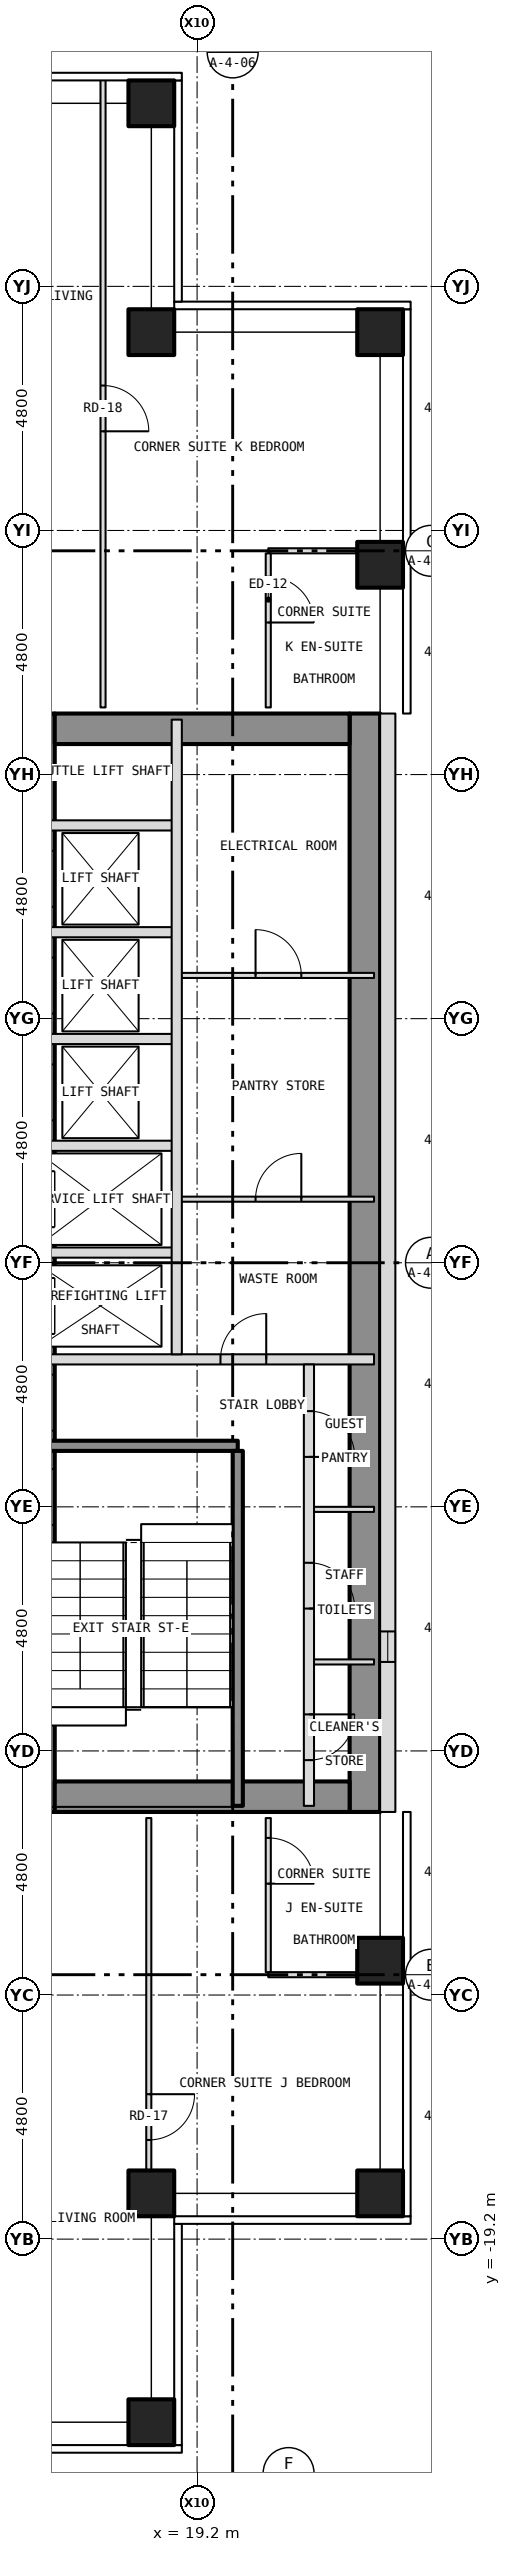
"""IFC4 building model, lengths in metres.
Left out: names, types, materials, properties, quantities, classifications, styles, units other than length and angle.
Written with IfcOpenShell. Run it as: python <this file> out.ifc"""

import sys

from ifc_helpers import new_model, si_unit, direction, frame, frame_2d, origin, origin_2d, place, context, subcontext, project, spatial, rectangle, hollow_rectangle, extrude, element, fill, save


model = new_model("IFC4")
c1 = context("Model", 3, precision=1e-05, world=origin(), true_north=direction((0.0, 1.0)))
c2 = subcontext(c1, "Body", "Model", "MODEL_VIEW")
j1 = project(units=[si_unit("LENGTHUNIT", "METRE"), si_unit("PLANEANGLEUNIT", "RADIAN")], contexts=[c1])
p1 = place(None, origin())
s1 = spatial("IfcSite", under=j1, at=p1, CompositionType="ELEMENT")
p2 = place(p1, origin())
s2 = spatial("IfcBuilding", under=s1, at=p2, CompositionType="ELEMENT")
p3 = place(p2, frame((0.0, 0.0, 113.5)))
s3 = spatial("IfcBuildingStorey", under=s2, at=p3, CompositionType="ELEMENT", Elevation=113.5)
for number, where, z_axis, x_axis in (
    (1, (18.3, 22.8, -0.15), (0.0, 0.0, 1.0), (1.0, 0.0, 0.0)),
    (2, (18.3, -22.8, -0.15), (0.0, 0.0, 1.0), (1.0, 0.0, 0.0)),
    (3, (22.8, -18.3, -0.15), (0.0, 0.0, 1.0), (1.0, 0.0, 0.0)),
    (4, (22.8, -13.725, -0.15), (0.0, 0.0, 1.0), (1.0, 0.0, 0.0)),
    (5, (22.8, 13.725, -0.15), (0.0, 0.0, 1.0), (1.0, 0.0, 0.0)),
    (6, (22.8, 18.3, -0.15), (0.0, 0.0, 1.0), (1.0, 0.0, 0.0)),
    (7, (18.3, -18.3, -0.15), (0.0, 0.0, 1.0), (1.0, 0.0, 0.0)),
    (8, (18.3, 18.3, -0.15), (0.0, 0.0, 1.0), (1.0, 0.0, 0.0)),
):
    element("IfcColumn", number, at=place(p3, frame(where, z_axis=z_axis, x_axis=x_axis)), inside=s3, PredefinedType="COLUMN", context=c2, shape_type="SweptSolid", body=[
        extrude(hollow_rectangle(XDim=0.9, YDim=0.9, WallThickness=0.05, at=origin_2d()), origin(), (0.0, 0.0, 1.0), 3.5),
    ])
p4 = place(p3, frame((16.1, -10.8, 0.0), z_axis=(0.0, 0.0, 1.0), x_axis=(0.0, 1.0, 0.0)))
e9 = element("IfcWall", 9, at=p4, inside=s3, PredefinedType="SHEAR", context=c2, shape_type="SweptSolid", body=[
    extrude(rectangle(XDim=21.6, YDim=0.6, at=frame_2d((10.8, 0.0))), origin(), (0.0, 0.0, 1.0), 3.25),
])
p5 = place(p4, frame((9.4, 0.0, 0.0)))
e10 = element("IfcOpeningElement", 10, at=p5, cuts=e9, PredefinedType="OPENING", context=c2, shape_type="SweptSolid", body=[
    extrude(rectangle(XDim=1.1, YDim=2.1, at=frame_2d((0.55, 1.05))), frame((0.0, 0.312, 0.0), z_axis=(0.0, -1.0, 0.0), x_axis=(1.0, 0.0, 0.0)), (0.0, 0.0, 1.0), 0.624),
])
p6 = place(p4, frame((11.5, 0.0, 0.0)))
e11 = element("IfcOpeningElement", 11, at=p6, cuts=e9, PredefinedType="OPENING", context=c2, shape_type="SweptSolid", body=[
    extrude(rectangle(XDim=1.1, YDim=2.1, at=frame_2d((0.55, 1.05))), frame((0.0, 0.312, 0.0), z_axis=(0.0, -1.0, 0.0), x_axis=(1.0, 0.0, 0.0)), (0.0, 0.0, 1.0), 0.624),
])
p7 = place(p4, frame((13.6, 0.0, 0.0)))
e12 = element("IfcOpeningElement", 12, at=p7, cuts=e9, PredefinedType="OPENING", context=c2, shape_type="SweptSolid", body=[
    extrude(rectangle(XDim=1.1, YDim=2.1, at=frame_2d((0.55, 1.05))), frame((0.0, 0.312, 0.0), z_axis=(0.0, -1.0, 0.0), x_axis=(1.0, 0.0, 0.0)), (0.0, 0.0, 1.0), 0.624),
])
p8 = place(p4, frame((15.7, 0.0, 0.0)))
e13 = element("IfcOpeningElement", 13, at=p8, cuts=e9, PredefinedType="OPENING", context=c2, shape_type="SweptSolid", body=[
    extrude(rectangle(XDim=1.1, YDim=2.1, at=frame_2d((0.55, 1.05))), frame((0.0, 0.312, 0.0), z_axis=(0.0, -1.0, 0.0), x_axis=(1.0, 0.0, 0.0)), (0.0, 0.0, 1.0), 0.624),
])
p9 = place(p4, frame((17.8, 0.0, 0.0)))
e14 = element("IfcOpeningElement", 14, at=p9, cuts=e9, PredefinedType="OPENING", context=c2, shape_type="SweptSolid", body=[
    extrude(rectangle(XDim=1.1, YDim=2.1, at=frame_2d((0.55, 1.05))), frame((0.0, 0.312, 0.0), z_axis=(0.0, -1.0, 0.0), x_axis=(1.0, 0.0, 0.0)), (0.0, 0.0, 1.0), 0.624),
])
p10 = place(p4, frame((5.642, 0.0, 0.0)))
e15 = element("IfcOpeningElement", 15, at=p10, cuts=e9, PredefinedType="OPENING", context=c2, shape_type="SweptSolid", body=[
    extrude(rectangle(XDim=1.1, YDim=2.1, at=frame_2d((0.55, 1.05))), frame((0.0, 0.312, 0.0), z_axis=(0.0, -1.0, 0.0), x_axis=(1.0, 0.0, 0.0)), (0.0, 0.0, 1.0), 0.624),
])
p11 = place(p4, frame((7.5, 0.0, 0.0)))
e16 = element("IfcOpeningElement", 16, at=p11, cuts=e9, PredefinedType="OPENING", context=c2, shape_type="SweptSolid", body=[
    extrude(rectangle(XDim=1.1, YDim=2.1, at=frame_2d((0.55, 1.05))), frame((0.0, 0.312, 0.0), z_axis=(0.0, -1.0, 0.0), x_axis=(1.0, 0.0, 0.0)), (0.0, 0.0, 1.0), 0.624),
])
p12 = place(p3, frame((22.5, -10.8, 0.0), z_axis=(0.0, 0.0, 1.0), x_axis=(0.0, 1.0, 0.0)))
e17 = element("IfcWall", 17, at=p12, inside=s3, PredefinedType="SHEAR", context=c2, shape_type="SweptSolid", body=[
    extrude(rectangle(XDim=21.6, YDim=0.6, at=frame_2d((10.8, 0.0))), origin(), (0.0, 0.0, 1.0), 3.25),
])
for number, where, z_axis, x_axis in (
    (18, (16.4, 10.5, 0.0), (0.0, 0.0, 1.0), (1.0, 0.0, 0.0)),
    (19, (16.4, -10.5, 0.0), (0.0, 0.0, 1.0), (1.0, 0.0, 0.0)),
):
    element("IfcWall", number, at=place(p3, frame(where, z_axis=z_axis, x_axis=x_axis)), inside=s3, PredefinedType="SHEAR", context=c2, shape_type="SweptSolid", body=[
        extrude(rectangle(XDim=5.8, YDim=0.6, at=frame_2d((2.9, 0.0))), origin(), (0.0, 0.0, 1.0), 3.25),
    ])
p13 = place(p3, frame((22.95, -10.8, 0.0), z_axis=(0.0, 0.0, 1.0), x_axis=(0.0, 1.0, 0.0)))
e20 = element("IfcWall", 20, at=p13, inside=s3, PredefinedType="SOLIDWALL", context=c2, shape_type="SweptSolid", body=[
    extrude(rectangle(XDim=21.6, YDim=0.3, at=frame_2d((10.8, 0.0))), origin(), (0.0, 0.0, 1.0), 3.5),
])
p14 = place(p13, frame((2.95, 0.0, 1.0)))
e21 = element("IfcOpeningElement", 21, at=p14, cuts=e20, PredefinedType="OPENING", context=c2, shape_type="SweptSolid", body=[
    extrude(rectangle(XDim=0.6, YDim=1.5, at=frame_2d((0.3, 0.75))), frame((0.0, 0.162, 0.0), z_axis=(0.0, -1.0, 0.0), x_axis=(1.0, 0.0, 0.0)), (0.0, 0.0, 1.0), 0.324),
])
p15 = place(p3, frame((20.6, -14.0, 0.0), z_axis=(0.0, 0.0, 1.0), x_axis=(1.0, 0.0, 0.0)))
e22 = element("IfcWall", 22, at=p15, inside=s3, PredefinedType="PARTITIONING", context=c2, shape_type="SweptSolid", body=[
    extrude(rectangle(XDim=2.08, YDim=0.1, at=frame_2d((1.04, 0.0))), origin(), (0.0, 0.0, 1.0), 3.35),
])
for number, where, z_axis, x_axis in (
    (23, (21.4, -7.85, 0.0), (0.0, 0.0, 1.0), (1.0, 0.0, 0.0)),
    (24, (21.4, -4.85, 0.0), (0.0, 0.0, 1.0), (1.0, 0.0, 0.0)),
):
    element("IfcWall", number, at=place(p3, frame(where, z_axis=z_axis, x_axis=x_axis)), inside=s3, PredefinedType="PARTITIONING", context=c2, shape_type="SweptSolid", body=[
        extrude(rectangle(XDim=1.28, YDim=0.1, at=frame_2d((0.64, 0.0))), origin(), (0.0, 0.0, 1.0), 3.25),
    ])
p16 = place(p3, frame((15.92, -3.6, 0.0), z_axis=(0.0, 0.0, 1.0), x_axis=(1.0, 0.0, 0.0)))
e25 = element("IfcWall", 25, at=p16, inside=s3, PredefinedType="SHEAR", context=c2, shape_type="SweptSolid", body=[
    extrude(rectangle(XDim=4.08, YDim=0.2, at=frame_2d((2.04, 0.0))), origin(), (0.0, 0.0, 1.0), 3.25),
])
p17 = place(p3, frame((15.92, -1.9, 0.0), z_axis=(0.0, 0.0, 1.0), x_axis=(1.0, 0.0, 0.0)))
e26 = element("IfcWall", 26, at=p17, inside=s3, PredefinedType="PARTITIONING", context=c2, shape_type="SweptSolid", body=[
    extrude(rectangle(XDim=6.76, YDim=0.2, at=frame_2d((3.38, 0.0))), origin(), (0.0, 0.0, 1.0), 3.25),
])
p18 = place(p17, frame((3.74, 0.0, 0.0)))
e27 = element("IfcOpeningElement", 27, at=p18, cuts=e26, PredefinedType="OPENING", context=c2, shape_type="SweptSolid", body=[
    extrude(rectangle(XDim=0.9, YDim=2.1, at=frame_2d((0.45, 1.05))), frame((0.0, 0.112, 0.0), z_axis=(0.0, -1.0, 0.0), x_axis=(1.0, 0.0, 0.0)), (0.0, 0.0, 1.0), 0.224),
])
p19 = place(p3, frame((15.92, 0.2, 0.0), z_axis=(0.0, 0.0, 1.0), x_axis=(1.0, 0.0, 0.0)))
e28 = element("IfcWall", 28, at=p19, inside=s3, PredefinedType="PARTITIONING", context=c2, shape_type="SweptSolid", body=[
    extrude(rectangle(XDim=2.88, YDim=0.2, at=frame_2d((1.44, 0.0))), origin(), (0.0, 0.0, 1.0), 3.25),
])
p20 = place(p3, frame((18.8, 1.25, 0.0), z_axis=(0.0, 0.0, 1.0), x_axis=(1.0, 0.0, 0.0)))
e29 = element("IfcWall", 29, at=p20, inside=s3, PredefinedType="PARTITIONING", context=c2, shape_type="SweptSolid", body=[
    extrude(rectangle(XDim=3.88, YDim=0.1, at=frame_2d((1.94, 0.0))), origin(), (0.0, 0.0, 1.0), 3.25),
])
p21 = place(p20, frame((1.55, 0.0, 0.0)))
e30 = element("IfcOpeningElement", 30, at=p21, cuts=e29, PredefinedType="OPENING", context=c2, shape_type="SweptSolid", body=[
    extrude(rectangle(XDim=0.9, YDim=2.1, at=frame_2d((0.45, 1.05))), frame((0.0, 0.062, 0.0), z_axis=(0.0, -1.0, 0.0), x_axis=(1.0, 0.0, 0.0)), (0.0, 0.0, 1.0), 0.124),
])
for number, where, z_axis, x_axis in (
    (31, (15.92, 2.3, 0.0), (0.0, 0.0, 1.0), (1.0, 0.0, 0.0)),
    (32, (15.92, 4.4, 0.0), (0.0, 0.0, 1.0), (1.0, 0.0, 0.0)),
):
    element("IfcWall", number, at=place(p3, frame(where, z_axis=z_axis, x_axis=x_axis)), inside=s3, PredefinedType="PARTITIONING", context=c2, shape_type="SweptSolid", body=[
        extrude(rectangle(XDim=2.88, YDim=0.2, at=frame_2d((1.44, 0.0))), origin(), (0.0, 0.0, 1.0), 3.25),
    ])
p22 = place(p3, frame((18.8, 5.65, 0.0), z_axis=(0.0, 0.0, 1.0), x_axis=(1.0, 0.0, 0.0)))
e33 = element("IfcWall", 33, at=p22, inside=s3, PredefinedType="PARTITIONING", context=c2, shape_type="SweptSolid", body=[
    extrude(rectangle(XDim=3.88, YDim=0.1, at=frame_2d((1.94, 0.0))), origin(), (0.0, 0.0, 1.0), 3.25),
])
p23 = place(p22, frame((1.55, 0.0, 0.0)))
e34 = element("IfcOpeningElement", 34, at=p23, cuts=e33, PredefinedType="OPENING", context=c2, shape_type="SweptSolid", body=[
    extrude(rectangle(XDim=0.9, YDim=2.1, at=frame_2d((0.45, 1.05))), frame((0.0, 0.062, 0.0), z_axis=(0.0, -1.0, 0.0), x_axis=(1.0, 0.0, 0.0)), (0.0, 0.0, 1.0), 0.124),
])
for number, where, z_axis, x_axis in (
    (35, (15.92, 6.5, 0.0), (0.0, 0.0, 1.0), (1.0, 0.0, 0.0)),
    (36, (15.92, 8.6, 0.0), (0.0, 0.0, 1.0), (1.0, 0.0, 0.0)),
):
    element("IfcWall", number, at=place(p3, frame(where, z_axis=z_axis, x_axis=x_axis)), inside=s3, PredefinedType="PARTITIONING", context=c2, shape_type="SweptSolid", body=[
        extrude(rectangle(XDim=2.88, YDim=0.2, at=frame_2d((1.44, 0.0))), origin(), (0.0, 0.0, 1.0), 3.25),
    ])
p24 = place(p3, frame((20.6, 14.0, 0.0), z_axis=(0.0, 0.0, 1.0), x_axis=(1.0, 0.0, 0.0)))
e37 = element("IfcWall", 37, at=p24, inside=s3, PredefinedType="PARTITIONING", context=c2, shape_type="SweptSolid", body=[
    extrude(rectangle(XDim=2.08, YDim=0.1, at=frame_2d((1.04, 0.0))), origin(), (0.0, 0.0, 1.0), 3.35),
])
p25 = place(p3, frame((17.35, 10.92, 0.0), z_axis=(0.0, 0.0, 1.0), x_axis=(0.0, 1.0, 0.0)))
e38 = element("IfcWall", 38, at=p25, inside=s3, PredefinedType="PARTITIONING", context=c2, shape_type="SweptSolid", body=[
    extrude(rectangle(XDim=12.36, YDim=0.1, at=frame_2d((6.18, 0.0))), origin(), (0.0, 0.0, 1.0), 3.35),
])
p26 = place(p25, frame((5.43, 0.0, 0.0)))
e39 = element("IfcOpeningElement", 39, at=p26, cuts=e38, PredefinedType="OPENING", context=c2, shape_type="SweptSolid", body=[
    extrude(rectangle(XDim=0.9, YDim=2.1, at=frame_2d((0.45, 1.05))), frame((0.0, 0.062, 0.0), z_axis=(0.0, -1.0, 0.0), x_axis=(1.0, 0.0, 0.0)), (0.0, 0.0, 1.0), 0.124),
])
p27 = place(p3, frame((18.25, -18.191, 0.0), z_axis=(0.0, 0.0, 1.0), x_axis=(0.0, 1.0, 0.0)))
e40 = element("IfcWall", 40, at=p27, inside=s3, PredefinedType="PARTITIONING", context=c2, shape_type="SweptSolid", body=[
    extrude(rectangle(XDim=7.271, YDim=0.1, at=frame_2d((3.635, 0.0))), origin(), (0.0, 0.0, 1.0), 3.35),
])
p28 = place(p27, frame((0.941, 0.0, 0.0)))
e41 = element("IfcOpeningElement", 41, at=p28, cuts=e40, PredefinedType="OPENING", context=c2, shape_type="SweptSolid", body=[
    extrude(rectangle(XDim=0.9, YDim=2.1, at=frame_2d((0.45, 1.05))), frame((0.0, 0.062, 0.0), z_axis=(0.0, -1.0, 0.0), x_axis=(1.0, 0.0, 0.0)), (0.0, 0.0, 1.0), 0.124),
])
p29 = place(p3, frame((18.8, -1.8, 0.0), z_axis=(0.0, 0.0, 1.0), x_axis=(0.0, 1.0, 0.0)))
e42 = element("IfcWall", 42, at=p29, inside=s3, PredefinedType="PARTITIONING", context=c2, shape_type="SweptSolid", body=[
    extrude(rectangle(XDim=12.48, YDim=0.2, at=frame_2d((6.24, 0.0))), origin(), (0.0, 0.0, 1.0), 3.25),
])
p30 = place(p3, frame((20.0, -10.68, 0.0), z_axis=(0.0, 0.0, 1.0), x_axis=(0.0, 1.0, 0.0)))
e43 = element("IfcWall", 43, at=p30, inside=s3, PredefinedType="SHEAR", context=c2, shape_type="SweptSolid", body=[
    extrude(rectangle(XDim=6.98, YDim=0.2, at=frame_2d((3.49, 0.0))), origin(), (0.0, 0.0, 1.0), 3.25),
])
p31 = place(p3, frame((20.6, -13.95, 0.0), z_axis=(0.0, 0.0, 1.0), x_axis=(0.0, 1.0, 0.0)))
e44 = element("IfcWall", 44, at=p31, inside=s3, PredefinedType="PARTITIONING", context=c2, shape_type="SweptSolid", body=[
    extrude(rectangle(XDim=3.03, YDim=0.1, at=frame_2d((1.515, 0.0))), origin(), (0.0, 0.0, 1.0), 3.35),
])
p32 = place(p31, frame((1.74, 0.0, 0.0)))
e45 = element("IfcOpeningElement", 45, at=p32, cuts=e44, PredefinedType="OPENING", context=c2, shape_type="SweptSolid", body=[
    extrude(rectangle(XDim=0.9, YDim=2.1, at=frame_2d((0.45, 1.05))), frame((0.0, 0.062, 0.0), z_axis=(0.0, -1.0, 0.0), x_axis=(1.0, 0.0, 0.0)), (0.0, 0.0, 1.0), 0.124),
])
p33 = place(p3, frame((20.6, 10.92, 0.0), z_axis=(0.0, 0.0, 1.0), x_axis=(0.0, 1.0, 0.0)))
e46 = element("IfcWall", 46, at=p33, inside=s3, PredefinedType="PARTITIONING", context=c2, shape_type="SweptSolid", body=[
    extrude(rectangle(XDim=3.03, YDim=0.1, at=frame_2d((1.515, 0.0))), origin(), (0.0, 0.0, 1.0), 3.35),
])
p34 = place(p33, frame((1.67, 0.0, 0.0)))
e47 = element("IfcOpeningElement", 47, at=p34, cuts=e46, PredefinedType="OPENING", context=c2, shape_type="SweptSolid", body=[
    extrude(rectangle(XDim=0.9, YDim=2.1, at=frame_2d((0.45, 1.05))), frame((0.0, 0.062, 0.0), z_axis=(0.0, -1.0, 0.0), x_axis=(1.0, 0.0, 0.0)), (0.0, 0.0, 1.0), 0.124),
])
p35 = place(p3, frame((21.4, -10.68, 0.0), z_axis=(0.0, 0.0, 1.0), x_axis=(0.0, 1.0, 0.0)))
e48 = element("IfcWall", 48, at=p35, inside=s3, PredefinedType="PARTITIONING", context=c2, shape_type="SweptSolid", body=[
    extrude(rectangle(XDim=8.68, YDim=0.2, at=frame_2d((4.34, 0.0))), origin(), (0.0, 0.0, 1.0), 3.25),
])
p36 = place(p35, frame((0.899, 0.0, 0.0)))
e49 = element("IfcOpeningElement", 49, at=p36, cuts=e48, PredefinedType="OPENING", context=c2, shape_type="SweptSolid", body=[
    extrude(rectangle(XDim=0.9, YDim=2.1, at=frame_2d((0.45, 1.05))), frame((0.0, 0.112, 0.0), z_axis=(0.0, -1.0, 0.0), x_axis=(1.0, 0.0, 0.0)), (0.0, 0.0, 1.0), 0.224),
])
p37 = place(p35, frame((3.88, 0.0, 0.0)))
e50 = element("IfcOpeningElement", 50, at=p37, cuts=e48, PredefinedType="OPENING", context=c2, shape_type="SweptSolid", body=[
    extrude(rectangle(XDim=0.9, YDim=2.1, at=frame_2d((0.45, 1.05))), frame((0.0, 0.112, 0.0), z_axis=(0.0, -1.0, 0.0), x_axis=(1.0, 0.0, 0.0)), (0.0, 0.0, 1.0), 0.224),
])
p38 = place(p35, frame((6.862, 0.0, 0.0)))
e51 = element("IfcOpeningElement", 51, at=p38, cuts=e48, PredefinedType="OPENING", context=c2, shape_type="SweptSolid", body=[
    extrude(rectangle(XDim=0.9, YDim=2.1, at=frame_2d((0.45, 1.05))), frame((0.0, 0.112, 0.0), z_axis=(0.0, -1.0, 0.0), x_axis=(1.0, 0.0, 0.0)), (0.0, 0.0, 1.0), 0.224),
])
p39 = place(p14, origin())
e52 = element("IfcWindow", 52, at=p39, inside=s3, PartitioningType="SINGLE_PANEL", PredefinedType="WINDOW", context=c2, shape_type="SweptSolid", body=[
    extrude(rectangle(XDim=0.6, YDim=1.5, at=frame_2d((0.3, 0.75))), frame((0.0, -0.06, 0.0), z_axis=(0.0, -1.0, 0.0), x_axis=(1.0, 0.0, 0.0)), (0.0, 0.0, 1.0), 0.06),
])
fill(e21, e52)
p40 = place(p36, origin())
e53 = element("IfcDoor", 53, at=p40, inside=s3, OperationType="SINGLE_SWING_RIGHT", PredefinedType="DOOR", context=c2, shape_type="SweptSolid", body=[
    extrude(rectangle(XDim=0.9, YDim=2.1, at=frame_2d((0.45, 1.05))), frame((0.0, 0.025, 0.0), z_axis=(0.0, -1.0, 0.0), x_axis=(1.0, 0.0, 0.0)), (0.0, 0.0, 1.0), 0.05),
])
fill(e49, e53)
p41 = place(p37, origin())
e54 = element("IfcDoor", 54, at=p41, inside=s3, OperationType="SINGLE_SWING_LEFT", PredefinedType="DOOR", context=c2, shape_type="SweptSolid", body=[
    extrude(rectangle(XDim=0.9, YDim=2.1, at=frame_2d((0.45, 1.05))), frame((0.0, 0.025, 0.0), z_axis=(0.0, -1.0, 0.0), x_axis=(1.0, 0.0, 0.0)), (0.0, 0.0, 1.0), 0.05),
])
fill(e50, e54)
p42 = place(p38, origin())
e55 = element("IfcDoor", 55, at=p42, inside=s3, OperationType="SINGLE_SWING_LEFT", PredefinedType="DOOR", context=c2, shape_type="SweptSolid", body=[
    extrude(rectangle(XDim=0.9, YDim=2.1, at=frame_2d((0.45, 1.05))), frame((0.0, 0.025, 0.0), z_axis=(0.0, -1.0, 0.0), x_axis=(1.0, 0.0, 0.0)), (0.0, 0.0, 1.0), 0.05),
])
fill(e51, e55)
p43 = place(p18, origin())
e56 = element("IfcDoor", 56, at=p43, inside=s3, OperationType="SINGLE_SWING_RIGHT", PredefinedType="DOOR", context=c2, shape_type="SweptSolid", body=[
    extrude(rectangle(XDim=0.9, YDim=2.1, at=frame_2d((0.45, 1.05))), frame((0.0, 0.025, 0.0), z_axis=(0.0, -1.0, 0.0), x_axis=(1.0, 0.0, 0.0)), (0.0, 0.0, 1.0), 0.05),
])
fill(e27, e56)
p44 = place(p21, origin())
e57 = element("IfcDoor", 57, at=p44, inside=s3, OperationType="SINGLE_SWING_RIGHT", PredefinedType="DOOR", context=c2, shape_type="SweptSolid", body=[
    extrude(rectangle(XDim=0.9, YDim=2.1, at=frame_2d((0.45, 1.05))), frame((0.0, 0.025, 0.0), z_axis=(0.0, -1.0, 0.0), x_axis=(1.0, 0.0, 0.0)), (0.0, 0.0, 1.0), 0.05),
])
fill(e30, e57)
p45 = place(p23, origin())
e58 = element("IfcDoor", 58, at=p45, inside=s3, OperationType="SINGLE_SWING_LEFT", PredefinedType="DOOR", context=c2, shape_type="SweptSolid", body=[
    extrude(rectangle(XDim=0.9, YDim=2.1, at=frame_2d((0.45, 1.05))), frame((0.0, 0.025, 0.0), z_axis=(0.0, -1.0, 0.0), x_axis=(1.0, 0.0, 0.0)), (0.0, 0.0, 1.0), 0.05),
])
fill(e34, e58)
p46 = place(p28, origin())
e59 = element("IfcDoor", 59, at=p46, inside=s3, OperationType="SINGLE_SWING_RIGHT", PredefinedType="DOOR", context=c2, shape_type="SweptSolid", body=[
    extrude(rectangle(XDim=0.9, YDim=2.1, at=frame_2d((0.45, 1.05))), frame((0.0, 0.025, 0.0), z_axis=(0.0, -1.0, 0.0), x_axis=(1.0, 0.0, 0.0)), (0.0, 0.0, 1.0), 0.05),
])
fill(e41, e59)
p47 = place(p32, origin())
e60 = element("IfcDoor", 60, at=p47, inside=s3, OperationType="SINGLE_SWING_LEFT", PredefinedType="DOOR", context=c2, shape_type="SweptSolid", body=[
    extrude(rectangle(XDim=0.9, YDim=2.1, at=frame_2d((0.45, 1.05))), frame((0.0, 0.025, 0.0), z_axis=(0.0, -1.0, 0.0), x_axis=(1.0, 0.0, 0.0)), (0.0, 0.0, 1.0), 0.05),
])
fill(e45, e60)
p48 = place(p26, origin())
e61 = element("IfcDoor", 61, at=p48, inside=s3, OperationType="SINGLE_SWING_LEFT", PredefinedType="DOOR", context=c2, shape_type="SweptSolid", body=[
    extrude(rectangle(XDim=0.9, YDim=2.1, at=frame_2d((0.45, 1.05))), frame((0.0, 0.025, 0.0), z_axis=(0.0, -1.0, 0.0), x_axis=(1.0, 0.0, 0.0)), (0.0, 0.0, 1.0), 0.05),
])
fill(e39, e61)
p49 = place(p34, origin())
e62 = element("IfcDoor", 62, at=p49, inside=s3, OperationType="SINGLE_SWING_LEFT", PredefinedType="DOOR", context=c2, shape_type="SweptSolid", body=[
    extrude(rectangle(XDim=0.9, YDim=2.1, at=frame_2d((0.45, 1.05))), frame((0.0, 0.025, 0.0), z_axis=(0.0, -1.0, 0.0), x_axis=(1.0, 0.0, 0.0)), (0.0, 0.0, 1.0), 0.05),
])
fill(e47, e62)
save(model, sys.argv[1])
